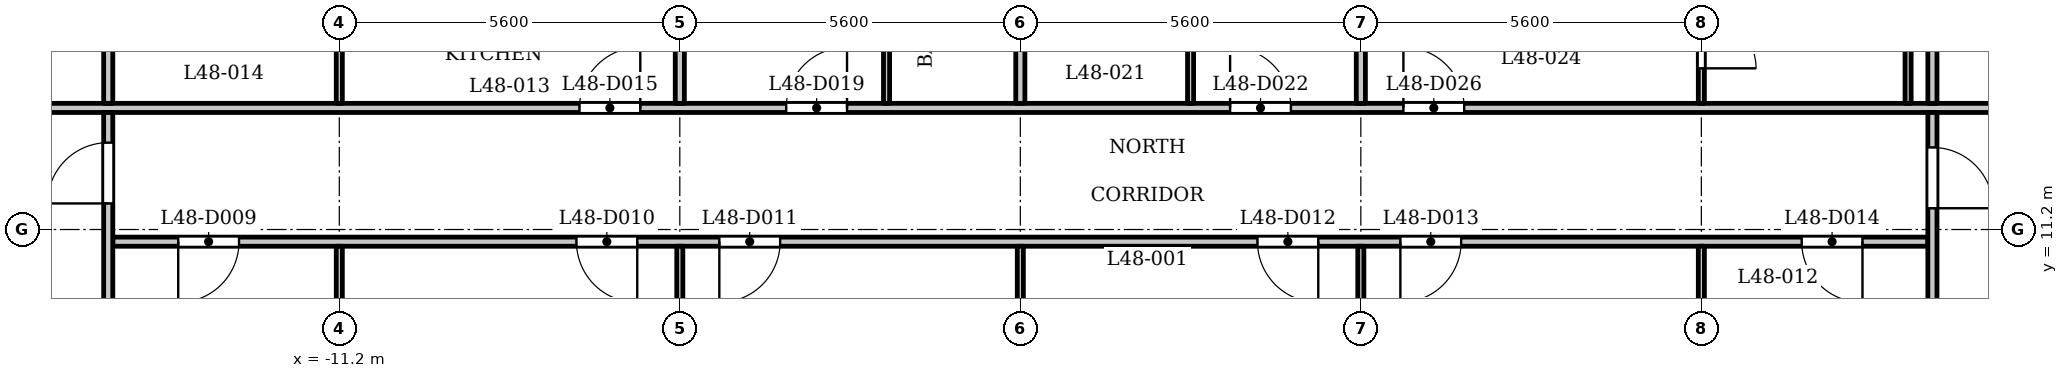
"""IFC4 building model, lengths in metres.
Left out: names, types, materials, properties, quantities, classifications, styles, units other than length and angle.
Written with IfcOpenShell. Run it as: python <this file> out.ifc"""

import sys

from ifc_helpers import new_model, si_unit, direction, frame, frame_2d, origin, place, context, subcontext, project, spatial, rectangle, extrude, element, fill, save


model = new_model("IFC4")
c1 = context("Model", 3, precision=1e-05, world=origin(), true_north=direction((0.0, 1.0)))
c2 = subcontext(c1, "Body", "Model", "MODEL_VIEW")
j1 = project(units=[si_unit("LENGTHUNIT", "METRE"), si_unit("PLANEANGLEUNIT", "RADIAN")], contexts=[c1])
p1 = place(None, origin())
s1 = spatial("IfcSite", under=j1, at=p1, CompositionType="ELEMENT")
p2 = place(p1, origin())
s2 = spatial("IfcBuilding", under=s1, at=p2, CompositionType="ELEMENT")
p3 = place(p2, frame((0.0, 0.0, 188.9)))
s3 = spatial("IfcBuildingStorey", under=s2, at=p3, CompositionType="ELEMENT", Elevation=188.9)
p4 = place(p3, frame((-14.925, 11.0, 0.0), z_axis=(0.0, 0.0, 1.0), x_axis=(1.0, 0.0, 0.0)))
e1 = element("IfcWall", 1, at=p4, inside=s3, PredefinedType="PARTITIONING", context=c2, shape_type="SweptSolid", body=[
    extrude(rectangle(XDim=29.85, YDim=0.15, at=frame_2d((14.925, 0.0))), origin(), (0.0, 0.0, 1.0), 3.2),
])
p5 = place(p4, frame((1.076, 0.0, 0.0)))
e2 = element("IfcOpeningElement", 2, at=p5, cuts=e1, PredefinedType="OPENING", context=c2, shape_type="SweptSolid", body=[
    extrude(rectangle(XDim=1.0, YDim=2.1, at=frame_2d((0.5, 1.05))), frame((0.0, 0.085, 0.0), z_axis=(0.0, -1.0, 0.0), x_axis=(1.0, 0.0, 0.0)), (0.0, 0.0, 1.0), 0.17),
])
p6 = place(p4, frame((7.625, 0.0, 0.0)))
e3 = element("IfcOpeningElement", 3, at=p6, cuts=e1, PredefinedType="OPENING", context=c2, shape_type="SweptSolid", body=[
    extrude(rectangle(XDim=1.0, YDim=2.1, at=frame_2d((0.5, 1.05))), frame((0.0, 0.085, 0.0), z_axis=(0.0, -1.0, 0.0), x_axis=(1.0, 0.0, 0.0)), (0.0, 0.0, 1.0), 0.17),
])
p7 = place(p4, frame((9.975, 0.0, 0.0)))
e4 = element("IfcOpeningElement", 4, at=p7, cuts=e1, PredefinedType="OPENING", context=c2, shape_type="SweptSolid", body=[
    extrude(rectangle(XDim=1.0, YDim=2.1, at=frame_2d((0.5, 1.05))), frame((0.0, 0.085, 0.0), z_axis=(0.0, -1.0, 0.0), x_axis=(1.0, 0.0, 0.0)), (0.0, 0.0, 1.0), 0.17),
])
p8 = place(p4, frame((18.825, 0.0, 0.0)))
e5 = element("IfcOpeningElement", 5, at=p8, cuts=e1, PredefinedType="OPENING", context=c2, shape_type="SweptSolid", body=[
    extrude(rectangle(XDim=1.0, YDim=2.1, at=frame_2d((0.5, 1.05))), frame((0.0, 0.085, 0.0), z_axis=(0.0, -1.0, 0.0), x_axis=(1.0, 0.0, 0.0)), (0.0, 0.0, 1.0), 0.17),
])
p9 = place(p4, frame((21.175, 0.0, 0.0)))
e6 = element("IfcOpeningElement", 6, at=p9, cuts=e1, PredefinedType="OPENING", context=c2, shape_type="SweptSolid", body=[
    extrude(rectangle(XDim=1.0, YDim=2.1, at=frame_2d((0.5, 1.05))), frame((0.0, 0.085, 0.0), z_axis=(0.0, -1.0, 0.0), x_axis=(1.0, 0.0, 0.0)), (0.0, 0.0, 1.0), 0.17),
])
p10 = place(p4, frame((27.775, 0.0, 0.0)))
e7 = element("IfcOpeningElement", 7, at=p10, cuts=e1, PredefinedType="OPENING", context=c2, shape_type="SweptSolid", body=[
    extrude(rectangle(XDim=1.0, YDim=2.1, at=frame_2d((0.5, 1.05))), frame((0.0, 0.085, 0.0), z_axis=(0.0, -1.0, 0.0), x_axis=(1.0, 0.0, 0.0)), (0.0, 0.0, 1.0), 0.17),
])
p11 = place(p3, frame((-17.4, 13.2, 0.0), z_axis=(0.0, 0.0, 1.0), x_axis=(1.0, 0.0, 0.0)))
e8 = element("IfcWall", 8, at=p11, inside=s3, PredefinedType="PARTITIONING", context=c2, shape_type="SweptSolid", body=[
    extrude(rectangle(XDim=34.8, YDim=0.15, at=frame_2d((17.4, 0.0))), origin(), (0.0, 0.0, 1.0), 3.2),
])
p12 = place(p11, frame((0.25, 0.0, 0.0)))
e9 = element("IfcOpeningElement", 9, at=p12, cuts=e8, PredefinedType="OPENING", context=c2, shape_type="SweptSolid", body=[
    extrude(rectangle(XDim=1.0, YDim=2.1, at=frame_2d((0.5, 1.05))), frame((0.0, 0.085, 0.0), z_axis=(0.0, -1.0, 0.0), x_axis=(1.0, 0.0, 0.0)), (0.0, 0.0, 1.0), 0.17),
])
p13 = place(p11, frame((33.65, 0.0, 0.0)))
e10 = element("IfcOpeningElement", 10, at=p13, cuts=e8, PredefinedType="OPENING", context=c2, shape_type="SweptSolid", body=[
    extrude(rectangle(XDim=1.0, YDim=2.1, at=frame_2d((0.5, 1.05))), frame((0.0, 0.085, 0.0), z_axis=(0.0, -1.0, 0.0), x_axis=(1.0, 0.0, 0.0)), (0.0, 0.0, 1.0), 0.17),
])
p14 = place(p11, frame((10.15, 0.0, 0.0)))
e11 = element("IfcOpeningElement", 11, at=p14, cuts=e8, PredefinedType="OPENING", context=c2, shape_type="SweptSolid", body=[
    extrude(rectangle(XDim=1.0, YDim=2.1, at=frame_2d((0.5, 1.05))), frame((0.0, 0.085, 0.0), z_axis=(0.0, -1.0, 0.0), x_axis=(1.0, 0.0, 0.0)), (0.0, 0.0, 1.0), 0.17),
])
p15 = place(p11, frame((13.55, 0.0, 0.0)))
e12 = element("IfcOpeningElement", 12, at=p15, cuts=e8, PredefinedType="OPENING", context=c2, shape_type="SweptSolid", body=[
    extrude(rectangle(XDim=1.0, YDim=2.1, at=frame_2d((0.5, 1.05))), frame((0.0, 0.085, 0.0), z_axis=(0.0, -1.0, 0.0), x_axis=(1.0, 0.0, 0.0)), (0.0, 0.0, 1.0), 0.17),
])
p16 = place(p11, frame((20.85, 0.0, 0.0)))
e13 = element("IfcOpeningElement", 13, at=p16, cuts=e8, PredefinedType="OPENING", context=c2, shape_type="SweptSolid", body=[
    extrude(rectangle(XDim=1.0, YDim=2.1, at=frame_2d((0.5, 1.05))), frame((0.0, 0.085, 0.0), z_axis=(0.0, -1.0, 0.0), x_axis=(1.0, 0.0, 0.0)), (0.0, 0.0, 1.0), 0.17),
])
p17 = place(p11, frame((23.7, 0.0, 0.0)))
e14 = element("IfcOpeningElement", 14, at=p17, cuts=e8, PredefinedType="OPENING", context=c2, shape_type="SweptSolid", body=[
    extrude(rectangle(XDim=1.0, YDim=2.1, at=frame_2d((0.5, 1.05))), frame((0.0, 0.085, 0.0), z_axis=(0.0, -1.0, 0.0), x_axis=(1.0, 0.0, 0.0)), (0.0, 0.0, 1.0), 0.17),
])
p18 = place(p3, frame((-15.0, 6.769, 0.0), z_axis=(0.0, 0.0, 1.0), x_axis=(0.0, 1.0, 0.0)))
e15 = element("IfcWall", 15, at=p18, inside=s3, PredefinedType="PARTITIONING", context=c2, shape_type="SweptSolid", body=[
    extrude(rectangle(XDim=6.356, YDim=0.15, at=frame_2d((3.178, 0.0))), origin(), (0.0, 0.0, 1.0), 3.2),
])
p19 = place(p18, frame((4.86, 0.0, 0.0)))
e16 = element("IfcOpeningElement", 16, at=p19, cuts=e15, PredefinedType="OPENING", context=c2, shape_type="SweptSolid", body=[
    extrude(rectangle(XDim=1.0, YDim=2.1, at=frame_2d((0.5, 1.05))), frame((0.0, 0.085, 0.0), z_axis=(0.0, -1.0, 0.0), x_axis=(1.0, 0.0, 0.0)), (0.0, 0.0, 1.0), 0.17),
])
p20 = place(p3, frame((-15.0, 13.275, 0.0), z_axis=(0.0, 0.0, 1.0), x_axis=(0.0, 1.0, 0.0)))
e17 = element("IfcWall", 17, at=p20, inside=s3, PredefinedType="PARTITIONING", context=c2, shape_type="SweptSolid", body=[
    extrude(rectangle(XDim=2.05, YDim=0.15, at=frame_2d((1.025, 0.0))), origin(), (0.0, 0.0, 1.0), 3.2),
])
p21 = place(p3, frame((-11.2, 7.32, 0.0), z_axis=(0.0, 0.0, 1.0), x_axis=(0.0, 1.0, 0.0)))
e18 = element("IfcWall", 18, at=p21, inside=s3, PredefinedType="PARTITIONING", context=c2, shape_type="SweptSolid", body=[
    extrude(rectangle(XDim=3.605, YDim=0.1, at=frame_2d((1.802, 0.0))), origin(), (0.0, 0.0, 1.0), 3.2),
])
p22 = place(p3, frame((-11.2, 13.275, 0.0), z_axis=(0.0, 0.0, 1.0), x_axis=(0.0, 1.0, 0.0)))
e19 = element("IfcWall", 19, at=p22, inside=s3, PredefinedType="PARTITIONING", context=c2, shape_type="SweptSolid", body=[
    extrude(rectangle(XDim=3.775, YDim=0.1, at=frame_2d((1.888, 0.0))), origin(), (0.0, 0.0, 1.0), 3.2),
])
p23 = place(p3, frame((-5.6, 7.32, 0.0), z_axis=(0.0, 0.0, 1.0), x_axis=(0.0, 1.0, 0.0)))
e20 = element("IfcWall", 20, at=p23, inside=s3, PredefinedType="PARTITIONING", context=c2, shape_type="SweptSolid", body=[
    extrude(rectangle(XDim=3.605, YDim=0.1, at=frame_2d((1.802, 0.0))), origin(), (0.0, 0.0, 1.0), 3.2),
])
p24 = place(p3, frame((-5.6, 13.275, 0.0), z_axis=(0.0, 0.0, 1.0), x_axis=(0.0, 1.0, 0.0)))
e21 = element("IfcWall", 21, at=p24, inside=s3, PredefinedType="PARTITIONING", context=c2, shape_type="SweptSolid", body=[
    extrude(rectangle(XDim=3.775, YDim=0.15, at=frame_2d((1.888, 0.0))), origin(), (0.0, 0.0, 1.0), 3.2),
])
p25 = place(p3, frame((-2.2, 13.275, 0.0), z_axis=(0.0, 0.0, 1.0), x_axis=(0.0, 1.0, 0.0)))
e22 = element("IfcWall", 22, at=p25, inside=s3, PredefinedType="PARTITIONING", context=c2, shape_type="SweptSolid", body=[
    extrude(rectangle(XDim=3.775, YDim=0.1, at=frame_2d((1.888, 0.0))), origin(), (0.0, 0.0, 1.0), 3.2),
])
p26 = place(p3, frame((0.0, 7.32, 0.0), z_axis=(0.0, 0.0, 1.0), x_axis=(0.0, 1.0, 0.0)))
e23 = element("IfcWall", 23, at=p26, inside=s3, PredefinedType="PARTITIONING", context=c2, shape_type="SweptSolid", body=[
    extrude(rectangle(XDim=3.605, YDim=0.1, at=frame_2d((1.802, 0.0))), origin(), (0.0, 0.0, 1.0), 3.2),
])
p27 = place(p3, frame((0.0, 13.275, 0.0), z_axis=(0.0, 0.0, 1.0), x_axis=(0.0, 1.0, 0.0)))
e24 = element("IfcWall", 24, at=p27, inside=s3, PredefinedType="PARTITIONING", context=c2, shape_type="SweptSolid", body=[
    extrude(rectangle(XDim=3.775, YDim=0.15, at=frame_2d((1.888, 0.0))), origin(), (0.0, 0.0, 1.0), 3.2),
])
p28 = place(p3, frame((2.8, 13.275, 0.0), z_axis=(0.0, 0.0, 1.0), x_axis=(0.0, 1.0, 0.0)))
e25 = element("IfcWall", 25, at=p28, inside=s3, PredefinedType="PARTITIONING", context=c2, shape_type="SweptSolid", body=[
    extrude(rectangle(XDim=3.775, YDim=0.1, at=frame_2d((1.888, 0.0))), origin(), (0.0, 0.0, 1.0), 3.2),
])
p29 = place(p3, frame((5.6, 7.32, 0.0), z_axis=(0.0, 0.0, 1.0), x_axis=(0.0, 1.0, 0.0)))
e26 = element("IfcWall", 26, at=p29, inside=s3, PredefinedType="PARTITIONING", context=c2, shape_type="SweptSolid", body=[
    extrude(rectangle(XDim=3.605, YDim=0.1, at=frame_2d((1.802, 0.0))), origin(), (0.0, 0.0, 1.0), 3.2),
])
p30 = place(p3, frame((5.6, 13.275, 0.0), z_axis=(0.0, 0.0, 1.0), x_axis=(0.0, 1.0, 0.0)))
e27 = element("IfcWall", 27, at=p30, inside=s3, PredefinedType="PARTITIONING", context=c2, shape_type="SweptSolid", body=[
    extrude(rectangle(XDim=3.775, YDim=0.15, at=frame_2d((1.888, 0.0))), origin(), (0.0, 0.0, 1.0), 3.2),
])
p31 = place(p3, frame((11.2, 7.32, 0.0), z_axis=(0.0, 0.0, 1.0), x_axis=(0.0, 1.0, 0.0)))
e28 = element("IfcWall", 28, at=p31, inside=s3, PredefinedType="PARTITIONING", context=c2, shape_type="SweptSolid", body=[
    extrude(rectangle(XDim=3.605, YDim=0.1, at=frame_2d((1.802, 0.0))), origin(), (0.0, 0.0, 1.0), 3.2),
])
p32 = place(p3, frame((11.2, 13.275, 0.0), z_axis=(0.0, 0.0, 1.0), x_axis=(0.0, 1.0, 0.0)))
e29 = element("IfcWall", 29, at=p32, inside=s3, PredefinedType="PARTITIONING", context=c2, shape_type="SweptSolid", body=[
    extrude(rectangle(XDim=3.775, YDim=0.1, at=frame_2d((1.888, 0.0))), origin(), (0.0, 0.0, 1.0), 3.2),
])
p33 = place(p32, frame((0.576, 0.0, 0.0)))
e30 = element("IfcOpeningElement", 30, at=p33, cuts=e29, PredefinedType="OPENING", context=c2, shape_type="SweptSolid", body=[
    extrude(rectangle(XDim=0.9, YDim=2.1, at=frame_2d((0.45, 1.05))), frame((0.0, 0.06, 0.0), z_axis=(0.0, -1.0, 0.0), x_axis=(1.0, 0.0, 0.0)), (0.0, 0.0, 1.0), 0.12),
])
p34 = place(p3, frame((14.6, 13.275, 0.0), z_axis=(0.0, 0.0, 1.0), x_axis=(0.0, 1.0, 0.0)))
e31 = element("IfcWall", 31, at=p34, inside=s3, PredefinedType="PARTITIONING", context=c2, shape_type="SweptSolid", body=[
    extrude(rectangle(XDim=3.775, YDim=0.1, at=frame_2d((1.888, 0.0))), origin(), (0.0, 0.0, 1.0), 3.2),
])
p35 = place(p3, frame((15.0, 6.769, 0.0), z_axis=(0.0, 0.0, 1.0), x_axis=(0.0, 1.0, 0.0)))
e32 = element("IfcWall", 32, at=p35, inside=s3, PredefinedType="PARTITIONING", context=c2, shape_type="SweptSolid", body=[
    extrude(rectangle(XDim=6.356, YDim=0.15, at=frame_2d((3.178, 0.0))), origin(), (0.0, 0.0, 1.0), 3.2),
])
p36 = place(p35, frame((4.781, 0.0, 0.0)))
e33 = element("IfcOpeningElement", 33, at=p36, cuts=e32, PredefinedType="OPENING", context=c2, shape_type="SweptSolid", body=[
    extrude(rectangle(XDim=1.0, YDim=2.1, at=frame_2d((0.5, 1.05))), frame((0.0, 0.085, 0.0), z_axis=(0.0, -1.0, 0.0), x_axis=(1.0, 0.0, 0.0)), (0.0, 0.0, 1.0), 0.17),
])
p37 = place(p3, frame((15.0, 13.275, 0.0), z_axis=(0.0, 0.0, 1.0), x_axis=(0.0, 1.0, 0.0)))
e34 = element("IfcWall", 34, at=p37, inside=s3, PredefinedType="PARTITIONING", context=c2, shape_type="SweptSolid", body=[
    extrude(rectangle(XDim=2.05, YDim=0.15, at=frame_2d((1.025, 0.0))), origin(), (0.0, 0.0, 1.0), 3.2),
])
p38 = place(p19, origin())
e35 = element("IfcDoor", 35, at=p38, inside=s3, OperationType="SINGLE_SWING_RIGHT", PredefinedType="DOOR", context=c2, shape_type="SweptSolid", body=[
    extrude(rectangle(XDim=1.0, YDim=2.1, at=frame_2d((0.5, 1.05))), frame((0.0, 0.025, 0.0), z_axis=(0.0, -1.0, 0.0), x_axis=(1.0, 0.0, 0.0)), (0.0, 0.0, 1.0), 0.05),
])
fill(e16, e35)
p39 = place(p36, origin())
e36 = element("IfcDoor", 36, at=p39, inside=s3, OperationType="SINGLE_SWING_LEFT", PredefinedType="DOOR", context=c2, shape_type="SweptSolid", body=[
    extrude(rectangle(XDim=1.0, YDim=2.1, at=frame_2d((0.5, 1.05))), frame((0.0, 0.025, 0.0), z_axis=(0.0, -1.0, 0.0), x_axis=(1.0, 0.0, 0.0)), (0.0, 0.0, 1.0), 0.05),
])
fill(e33, e36)
p40 = place(p5, origin())
e37 = element("IfcDoor", 37, at=p40, inside=s3, OperationType="SINGLE_SWING_LEFT", PredefinedType="DOOR", context=c2, shape_type="SweptSolid", body=[
    extrude(rectangle(XDim=1.0, YDim=2.1, at=frame_2d((0.5, 1.05))), frame((0.0, 0.025, 0.0), z_axis=(0.0, -1.0, 0.0), x_axis=(1.0, 0.0, 0.0)), (0.0, 0.0, 1.0), 0.05),
])
fill(e2, e37)
p41 = place(p6, origin())
e38 = element("IfcDoor", 38, at=p41, inside=s3, OperationType="SINGLE_SWING_RIGHT", PredefinedType="DOOR", context=c2, shape_type="SweptSolid", body=[
    extrude(rectangle(XDim=1.0, YDim=2.1, at=frame_2d((0.5, 1.05))), frame((0.0, 0.025, 0.0), z_axis=(0.0, -1.0, 0.0), x_axis=(1.0, 0.0, 0.0)), (0.0, 0.0, 1.0), 0.05),
])
fill(e3, e38)
p42 = place(p7, origin())
e39 = element("IfcDoor", 39, at=p42, inside=s3, OperationType="SINGLE_SWING_LEFT", PredefinedType="DOOR", context=c2, shape_type="SweptSolid", body=[
    extrude(rectangle(XDim=1.0, YDim=2.1, at=frame_2d((0.5, 1.05))), frame((0.0, 0.025, 0.0), z_axis=(0.0, -1.0, 0.0), x_axis=(1.0, 0.0, 0.0)), (0.0, 0.0, 1.0), 0.05),
])
fill(e4, e39)
p43 = place(p8, origin())
e40 = element("IfcDoor", 40, at=p43, inside=s3, OperationType="SINGLE_SWING_RIGHT", PredefinedType="DOOR", context=c2, shape_type="SweptSolid", body=[
    extrude(rectangle(XDim=1.0, YDim=2.1, at=frame_2d((0.5, 1.05))), frame((0.0, 0.025, 0.0), z_axis=(0.0, -1.0, 0.0), x_axis=(1.0, 0.0, 0.0)), (0.0, 0.0, 1.0), 0.05),
])
fill(e5, e40)
p44 = place(p9, origin())
e41 = element("IfcDoor", 41, at=p44, inside=s3, OperationType="SINGLE_SWING_LEFT", PredefinedType="DOOR", context=c2, shape_type="SweptSolid", body=[
    extrude(rectangle(XDim=1.0, YDim=2.1, at=frame_2d((0.5, 1.05))), frame((0.0, 0.025, 0.0), z_axis=(0.0, -1.0, 0.0), x_axis=(1.0, 0.0, 0.0)), (0.0, 0.0, 1.0), 0.05),
])
fill(e6, e41)
p45 = place(p10, origin())
e42 = element("IfcDoor", 42, at=p45, inside=s3, OperationType="SINGLE_SWING_RIGHT", PredefinedType="DOOR", context=c2, shape_type="SweptSolid", body=[
    extrude(rectangle(XDim=1.0, YDim=2.1, at=frame_2d((0.5, 1.05))), frame((0.0, 0.025, 0.0), z_axis=(0.0, -1.0, 0.0), x_axis=(1.0, 0.0, 0.0)), (0.0, 0.0, 1.0), 0.05),
])
fill(e7, e42)
p46 = place(p14, origin())
e43 = element("IfcDoor", 43, at=p46, inside=s3, OperationType="SINGLE_SWING_LEFT", PredefinedType="DOOR", context=c2, shape_type="SweptSolid", body=[
    extrude(rectangle(XDim=1.0, YDim=2.1, at=frame_2d((0.5, 1.05))), frame((0.0, 0.025, 0.0), z_axis=(0.0, -1.0, 0.0), x_axis=(1.0, 0.0, 0.0)), (0.0, 0.0, 1.0), 0.05),
])
fill(e11, e43)
p47 = place(p15, origin())
e44 = element("IfcDoor", 44, at=p47, inside=s3, OperationType="SINGLE_SWING_LEFT", PredefinedType="DOOR", context=c2, shape_type="SweptSolid", body=[
    extrude(rectangle(XDim=1.0, YDim=2.1, at=frame_2d((0.5, 1.05))), frame((0.0, 0.025, 0.0), z_axis=(0.0, -1.0, 0.0), x_axis=(1.0, 0.0, 0.0)), (0.0, 0.0, 1.0), 0.05),
])
fill(e12, e44)
p48 = place(p16, origin())
e45 = element("IfcDoor", 45, at=p48, inside=s3, OperationType="SINGLE_SWING_RIGHT", PredefinedType="DOOR", context=c2, shape_type="SweptSolid", body=[
    extrude(rectangle(XDim=1.0, YDim=2.1, at=frame_2d((0.5, 1.05))), frame((0.0, 0.025, 0.0), z_axis=(0.0, -1.0, 0.0), x_axis=(1.0, 0.0, 0.0)), (0.0, 0.0, 1.0), 0.05),
])
fill(e13, e45)
p49 = place(p17, origin())
e46 = element("IfcDoor", 46, at=p49, inside=s3, OperationType="SINGLE_SWING_RIGHT", PredefinedType="DOOR", context=c2, shape_type="SweptSolid", body=[
    extrude(rectangle(XDim=1.0, YDim=2.1, at=frame_2d((0.5, 1.05))), frame((0.0, 0.025, 0.0), z_axis=(0.0, -1.0, 0.0), x_axis=(1.0, 0.0, 0.0)), (0.0, 0.0, 1.0), 0.05),
])
fill(e14, e46)
p50 = place(p33, origin())
e47 = element("IfcDoor", 47, at=p50, inside=s3, OperationType="SINGLE_SWING_LEFT", PredefinedType="DOOR", context=c2, shape_type="SweptSolid", body=[
    extrude(rectangle(XDim=0.9, YDim=2.1, at=frame_2d((0.45, 1.05))), frame((0.0, 0.025, 0.0), z_axis=(0.0, -1.0, 0.0), x_axis=(1.0, 0.0, 0.0)), (0.0, 0.0, 1.0), 0.05),
])
fill(e30, e47)
save(model, sys.argv[1])
